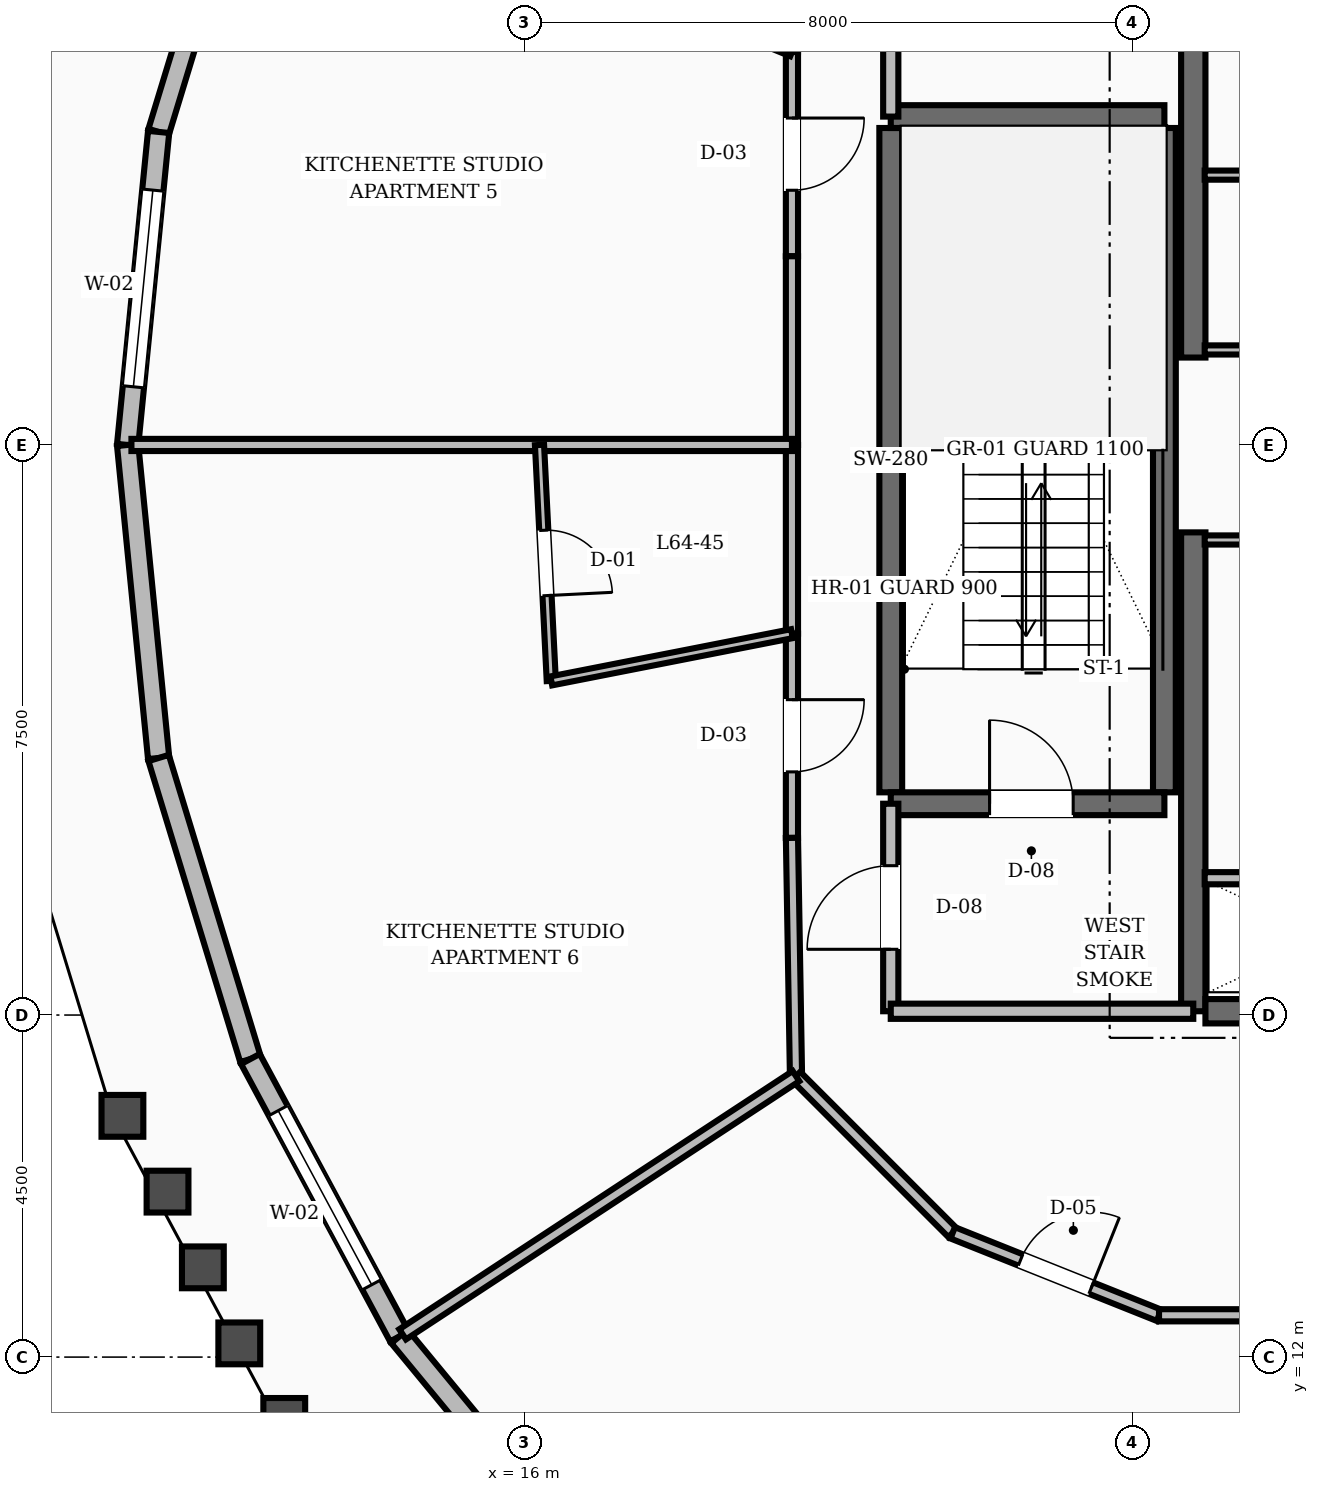
"""IFC4 building model, lengths in metres.
Left out: names, types, materials, properties, quantities, classifications, styles, units other than length and angle.
Written with IfcOpenShell. Run it as: python <this file> out.ifc"""

import sys

from ifc_helpers import new_model, si_unit, direction, frame, frame_2d, origin, place, context, subcontext, project, spatial, rectangle, extrude, element, fill, save


model = new_model("IFC4")
c1 = context("Model", 3, precision=1e-05, world=origin(), true_north=direction((0.0, 1.0)))
c2 = subcontext(c1, "Body", "Model", "MODEL_VIEW")
j1 = project(units=[si_unit("LENGTHUNIT", "METRE"), si_unit("PLANEANGLEUNIT", "RADIAN")], contexts=[c1])
p1 = place(None, origin())
s1 = spatial("IfcSite", under=j1, at=p1, CompositionType="ELEMENT")
p2 = place(p1, origin())
s2 = spatial("IfcBuilding", under=s1, at=p2, CompositionType="ELEMENT")
p3 = place(p2, frame((0.0, 0.0, 247.2)))
s3 = spatial("IfcBuildingStorey", under=s2, at=p3, CompositionType="ELEMENT", Elevation=247.2)
for number, where, z_axis, x_axis in (
    (1, (24.8, 16.55, 0.0), (0.0, 0.0, 1.0), (0.0, 1.0, 0.0)),
    (2, (24.8, 25.15, 0.0), (0.0, 0.0, 1.0), (0.0, 1.0, 0.0)),
):
    element("IfcWall", number, at=place(p3, frame(where, z_axis=z_axis, x_axis=x_axis)), inside=s3, PredefinedType="SHEAR", context=c2, shape_type="SweptSolid", body=[
        extrude(rectangle(XDim=6.3, YDim=0.32, at=frame_2d((3.15, 0.0))), origin(), (0.0, 0.0, 1.0), 3.6),
    ])
p4 = place(p3, frame((24.96, 16.55, 0.0), z_axis=(0.0, 0.0, 1.0), x_axis=(1.0, 0.0, 0.0)))
e3 = element("IfcWall", 3, at=p4, inside=s3, PredefinedType="SHEAR", context=c2, shape_type="SweptSolid", body=[
    extrude(rectangle(XDim=3.24, YDim=0.32, at=frame_2d((1.62, 0.0))), origin(), (0.0, 0.0, 1.0), 3.6),
])
for number, where, z_axis, x_axis in (
    (4, (20.82, 19.43, 0.0), (0.0, 0.0, 1.0), (0.0, 1.0, 0.0)),
    (5, (24.42, 19.43, 0.0), (0.0, 0.0, 1.0), (0.0, 1.0, 0.0)),
):
    element("IfcWall", number, at=place(p3, frame(where, z_axis=z_axis, x_axis=x_axis)), inside=s3, PredefinedType="SHEAR", context=c2, shape_type="SweptSolid", body=[
        extrude(rectangle(XDim=8.74, YDim=0.3, at=frame_2d((4.37, 0.0))), origin(), (0.0, 0.0, 1.0), 3.6),
    ])
p5 = place(p3, frame((20.82, 19.28, 0.0), z_axis=(0.0, 0.0, 1.0), x_axis=(1.0, 0.0, 0.0)))
e6 = element("IfcWall", 6, at=p5, inside=s3, PredefinedType="SHEAR", context=c2, shape_type="SweptSolid", body=[
    extrude(rectangle(XDim=3.6, YDim=0.3, at=frame_2d((1.8, 0.0))), origin(), (0.0, 0.0, 1.0), 3.6),
])
p6 = place(p5, frame((1.3, 0.0, 0.0)))
e7 = element("IfcOpeningElement", 7, at=p6, cuts=e6, PredefinedType="OPENING", context=c2, shape_type="SweptSolid", body=[
    extrude(rectangle(XDim=1.1, YDim=2.1, at=frame_2d((0.55, 1.05))), frame((0.0, 0.16, 0.0), z_axis=(0.0, -1.0, 0.0), x_axis=(1.0, 0.0, 0.0)), (0.0, 0.0, 1.0), 0.32),
])
p7 = place(p3, frame((20.82, 28.32, 0.0), z_axis=(0.0, 0.0, 1.0), x_axis=(1.0, 0.0, 0.0)))
e8 = element("IfcWall", 8, at=p7, inside=s3, PredefinedType="SHEAR", context=c2, shape_type="SweptSolid", body=[
    extrude(rectangle(XDim=3.6, YDim=0.3, at=frame_2d((1.8, 0.0))), origin(), (0.0, 0.0, 1.0), 3.6),
])
p8 = place(p3, frame((12.396, 32.078, 0.0), z_axis=(0.0, 0.0, 1.0), x_axis=(-0.291673136786, -0.95651805068, 0.0)))
e9 = element("IfcWall", 9, at=p8, inside=s3, PredefinedType="STANDARD", context=c2, shape_type="SweptSolid", body=[
    extrude(rectangle(XDim=4.14, YDim=0.28, at=frame_2d((2.07, 0.0))), origin(), (0.0, 0.0, 1.0), 2.88),
])
p9 = place(p3, frame((11.188, 28.118, 0.0), z_axis=(0.0, 0.0, 1.0), x_axis=(-0.098516576832, -0.995135409926, 0.0)))
e10 = element("IfcWall", 10, at=p9, inside=s3, PredefinedType="STANDARD", context=c2, shape_type="SweptSolid", body=[
    extrude(rectangle(XDim=4.138, YDim=0.28, at=frame_2d((2.069, 0.0))), origin(), (0.0, 0.0, 1.0), 2.88),
])
p10 = place(p9, frame((0.769, 0.0, 0.8)))
e11 = element("IfcOpeningElement", 11, at=p10, cuts=e10, PredefinedType="OPENING", context=c2, shape_type="SweptSolid", body=[
    extrude(rectangle(XDim=2.6, YDim=1.65, at=frame_2d((1.3, 0.825))), frame((0.0, 0.15, 0.0), z_axis=(0.0, -1.0, 0.0), x_axis=(1.0, 0.0, 0.0)), (0.0, 0.0, 1.0), 0.3),
])
p11 = place(p3, frame((10.78, 24.0, 0.0), z_axis=(0.0, 0.0, 1.0), x_axis=(0.098516576832, -0.995135409926, 0.0)))
e12 = element("IfcWall", 12, at=p11, inside=s3, PredefinedType="STANDARD", context=c2, shape_type="SweptSolid", body=[
    extrude(rectangle(XDim=4.138, YDim=0.28, at=frame_2d((2.069, 0.0))), origin(), (0.0, 0.0, 1.0), 2.88),
])
p12 = place(p3, frame((11.188, 19.882, 0.0), z_axis=(0.0, 0.0, 1.0), x_axis=(0.291673136786, -0.95651805068, 0.0)))
e13 = element("IfcWall", 13, at=p12, inside=s3, PredefinedType="STANDARD", context=c2, shape_type="SweptSolid", body=[
    extrude(rectangle(XDim=4.14, YDim=0.28, at=frame_2d((2.07, 0.0))), origin(), (0.0, 0.0, 1.0), 2.88),
])
p13 = place(p3, frame((12.396, 15.922, 0.0), z_axis=(0.0, 0.0, 1.0), x_axis=(0.473326520675, -0.880887055658, 0.0)))
e14 = element("IfcWall", 14, at=p13, inside=s3, PredefinedType="STANDARD", context=c2, shape_type="SweptSolid", body=[
    extrude(rectangle(XDim=4.143, YDim=0.28, at=frame_2d((2.071, 0.0))), origin(), (0.0, 0.0, 1.0), 2.88),
])
p14 = place(p13, frame((0.771, 0.0, 0.8)))
e15 = element("IfcOpeningElement", 15, at=p14, cuts=e14, PredefinedType="OPENING", context=c2, shape_type="SweptSolid", body=[
    extrude(rectangle(XDim=2.6, YDim=1.65, at=frame_2d((1.3, 0.825))), frame((0.0, 0.15, 0.0), z_axis=(0.0, -1.0, 0.0), x_axis=(1.0, 0.0, 0.0)), (0.0, 0.0, 1.0), 0.3),
])
p15 = place(p3, frame((14.356, 12.272, 0.0), z_axis=(0.0, 0.0, 1.0), x_axis=(0.63634880002, -0.771401454959, 0.0)))
e16 = element("IfcWall", 16, at=p15, inside=s3, PredefinedType="STANDARD", context=c2, shape_type="SweptSolid", body=[
    extrude(rectangle(XDim=4.147, YDim=0.28, at=frame_2d((2.073, 0.0))), origin(), (0.0, 0.0, 1.0), 2.88),
])
p16 = place(p3, frame((20.82, 16.55, 0.0), z_axis=(0.0, 0.0, 1.0), x_axis=(0.0, 1.0, 0.0)))
e17 = element("IfcWall", 17, at=p16, inside=s3, PredefinedType="SOLIDWALL", context=c2, shape_type="SweptSolid", body=[
    extrude(rectangle(XDim=2.73, YDim=0.2, at=frame_2d((1.365, 0.0))), origin(), (0.0, 0.0, 1.0), 2.87),
])
p17 = place(p16, frame((0.815, 0.0, 0.0)))
e18 = element("IfcOpeningElement", 18, at=p17, cuts=e17, PredefinedType="OPENING", context=c2, shape_type="SweptSolid", body=[
    extrude(rectangle(XDim=1.1, YDim=2.1, at=frame_2d((0.55, 1.05))), frame((0.0, 0.11, 0.0), z_axis=(0.0, -1.0, 0.0), x_axis=(1.0, 0.0, 0.0)), (0.0, 0.0, 1.0), 0.22),
])
p18 = place(p3, frame((20.82, 16.55, 0.0), z_axis=(0.0, 0.0, 1.0), x_axis=(1.0, 0.0, 0.0)))
e19 = element("IfcWall", 19, at=p18, inside=s3, PredefinedType="SOLIDWALL", context=c2, shape_type="SweptSolid", body=[
    extrude(rectangle(XDim=3.98, YDim=0.2, at=frame_2d((1.99, 0.0))), origin(), (0.0, 0.0, 1.0), 2.87),
])
p19 = place(p3, frame((20.82, 28.32, 0.0), z_axis=(0.0, 0.0, 1.0), x_axis=(0.0, 1.0, 0.0)))
e20 = element("IfcWall", 20, at=p19, inside=s3, PredefinedType="SOLIDWALL", context=c2, shape_type="SweptSolid", body=[
    extrude(rectangle(XDim=3.13, YDim=0.2, at=frame_2d((1.565, 0.0))), origin(), (0.0, 0.0, 1.0), 2.87),
])
p20 = place(p19, frame((1.09, 0.0, 0.0)))
e21 = element("IfcOpeningElement", 21, at=p20, cuts=e20, PredefinedType="OPENING", context=c2, shape_type="SweptSolid", body=[
    extrude(rectangle(XDim=0.95, YDim=2.1, at=frame_2d((0.475, 1.05))), frame((0.0, 0.11, 0.0), z_axis=(0.0, -1.0, 0.0), x_axis=(1.0, 0.0, 0.0)), (0.0, 0.0, 1.0), 0.22),
])
p21 = place(p3, frame((24.95, 18.3, 0.0), z_axis=(0.0, 0.0, 1.0), x_axis=(1.0, 0.0, 0.0)))
e22 = element("IfcWall", 22, at=p21, inside=s3, PredefinedType="SOLIDWALL", context=c2, shape_type="SweptSolid", body=[
    extrude(rectangle(XDim=3.2, YDim=0.16, at=frame_2d((1.6, 0.0))), origin(), (0.0, 0.0, 1.0), 2.87),
])
p22 = place(p3, frame((24.95, 25.25, 0.0), z_axis=(0.0, 0.0, 1.0), x_axis=(1.0, 0.0, 0.0)))
e23 = element("IfcWall", 23, at=p22, inside=s3, PredefinedType="PARTITIONING", context=c2, shape_type="SweptSolid", body=[
    extrude(rectangle(XDim=3.2, YDim=0.12, at=frame_2d((1.6, 0.0))), origin(), (0.0, 0.0, 1.0), 2.87),
])
p23 = place(p22, frame((1.125, 0.0, 0.0)))
e24 = element("IfcOpeningElement", 24, at=p23, cuts=e23, PredefinedType="OPENING", context=c2, shape_type="SweptSolid", body=[
    extrude(rectangle(XDim=0.95, YDim=2.1, at=frame_2d((0.475, 1.05))), frame((0.0, 0.07, 0.0), z_axis=(0.0, -1.0, 0.0), x_axis=(1.0, 0.0, 0.0)), (0.0, 0.0, 1.0), 0.14),
])
p24 = place(p3, frame((24.95, 22.75, 0.0), z_axis=(0.0, 0.0, 1.0), x_axis=(1.0, 0.0, 0.0)))
e25 = element("IfcWall", 25, at=p24, inside=s3, PredefinedType="PARTITIONING", context=c2, shape_type="SweptSolid", body=[
    extrude(rectangle(XDim=3.2, YDim=0.12, at=frame_2d((1.6, 0.0))), origin(), (0.0, 0.0, 1.0), 2.87),
])
p25 = place(p24, frame((1.125, 0.0, 0.0)))
e26 = element("IfcOpeningElement", 26, at=p25, cuts=e25, PredefinedType="OPENING", context=c2, shape_type="SweptSolid", body=[
    extrude(rectangle(XDim=0.95, YDim=2.1, at=frame_2d((0.475, 1.05))), frame((0.0, 0.07, 0.0), z_axis=(0.0, -1.0, 0.0), x_axis=(1.0, 0.0, 0.0)), (0.0, 0.0, 1.0), 0.14),
])
p26 = place(p3, frame((24.95, 27.55, 0.0), z_axis=(0.0, 0.0, 1.0), x_axis=(1.0, 0.0, 0.0)))
e27 = element("IfcWall", 27, at=p26, inside=s3, PredefinedType="PARTITIONING", context=c2, shape_type="SweptSolid", body=[
    extrude(rectangle(XDim=3.2, YDim=0.12, at=frame_2d((1.6, 0.0))), origin(), (0.0, 0.0, 1.0), 2.87),
])
p27 = place(p26, frame((1.125, 0.0, 0.0)))
e28 = element("IfcOpeningElement", 28, at=p27, cuts=e27, PredefinedType="OPENING", context=c2, shape_type="SweptSolid", body=[
    extrude(rectangle(XDim=0.95, YDim=2.1, at=frame_2d((0.475, 1.05))), frame((0.0, 0.07, 0.0), z_axis=(0.0, -1.0, 0.0), x_axis=(1.0, 0.0, 0.0)), (0.0, 0.0, 1.0), 0.14),
])
p28 = place(p3, frame((19.573, 32.303, 0.0), z_axis=(0.0, 0.0, 1.0), x_axis=(-0.016981035134, -0.999855811828, 0.0)))
e29 = element("IfcWall", 29, at=p28, inside=s3, PredefinedType="SOLIDWALL", context=c2, shape_type="SweptSolid", body=[
    extrude(rectangle(XDim=3.134, YDim=0.16, at=frame_2d((1.567, 0.0))), origin(), (0.0, 0.0, 1.0), 2.87),
])
p29 = place(p3, frame((19.52, 29.169, 0.0), z_axis=(0.0, 0.0, 1.0), x_axis=(0.0, -1.0, 0.0)))
e30 = element("IfcWall", 30, at=p29, inside=s3, PredefinedType="SOLIDWALL", context=c2, shape_type="SweptSolid", body=[
    extrude(rectangle(XDim=2.687, YDim=0.16, at=frame_2d((1.344, 0.0))), origin(), (0.0, 0.0, 1.0), 2.87),
])
p30 = place(p29, frame((0.868, 0.0, 0.0)))
e31 = element("IfcOpeningElement", 31, at=p30, cuts=e30, PredefinedType="OPENING", context=c2, shape_type="SweptSolid", body=[
    extrude(rectangle(XDim=0.95, YDim=2.1, at=frame_2d((0.475, 1.05))), frame((0.0, 0.09, 0.0), z_axis=(0.0, -1.0, 0.0), x_axis=(1.0, 0.0, 0.0)), (0.0, 0.0, 1.0), 0.18),
])
for number, where, z_axis, x_axis in (
    (32, (19.52, 26.482, 0.0), (0.0, 0.0, 1.0), (0.0, -1.0, 0.0)),
    (33, (19.52, 24.0, 0.0), (0.0, 0.0, 1.0), (0.0, -1.0, 0.0)),
):
    element("IfcWall", number, at=place(p3, frame(where, z_axis=z_axis, x_axis=x_axis)), inside=s3, PredefinedType="SOLIDWALL", context=c2, shape_type="SweptSolid", body=[
        extrude(rectangle(XDim=2.482, YDim=0.16, at=frame_2d((1.241, 0.0))), origin(), (0.0, 0.0, 1.0), 2.87),
    ])
p31 = place(p3, frame((19.52, 21.518, 0.0), z_axis=(0.0, 0.0, 1.0), x_axis=(0.0, -1.0, 0.0)))
e34 = element("IfcWall", 34, at=p31, inside=s3, PredefinedType="SOLIDWALL", context=c2, shape_type="SweptSolid", body=[
    extrude(rectangle(XDim=2.687, YDim=0.16, at=frame_2d((1.344, 0.0))), origin(), (0.0, 0.0, 1.0), 2.87),
])
p32 = place(p31, frame((0.868, 0.0, 0.0)))
e35 = element("IfcOpeningElement", 35, at=p32, cuts=e34, PredefinedType="OPENING", context=c2, shape_type="SweptSolid", body=[
    extrude(rectangle(XDim=0.95, YDim=2.1, at=frame_2d((0.475, 1.05))), frame((0.0, 0.09, 0.0), z_axis=(0.0, -1.0, 0.0), x_axis=(1.0, 0.0, 0.0)), (0.0, 0.0, 1.0), 0.18),
])
p33 = place(p3, frame((19.52, 18.831, 0.0), z_axis=(0.0, 0.0, 1.0), x_axis=(0.016981035134, -0.999855811828, 0.0)))
e36 = element("IfcWall", 36, at=p33, inside=s3, PredefinedType="SOLIDWALL", context=c2, shape_type="SweptSolid", body=[
    extrude(rectangle(XDim=3.134, YDim=0.16, at=frame_2d((1.567, 0.0))), origin(), (0.0, 0.0, 1.0), 2.87),
])
p34 = place(p3, frame((19.573, 15.697, 0.0), z_axis=(0.0, 0.0, 1.0), x_axis=(0.707106781187, -0.707106781187, 0.0)))
e37 = element("IfcWall", 37, at=p34, inside=s3, PredefinedType="SOLIDWALL", context=c2, shape_type="SweptSolid", body=[
    extrude(rectangle(XDim=2.916, YDim=0.16, at=frame_2d((1.458, 0.0))), origin(), (0.0, 0.0, 1.0), 2.87),
])
p35 = place(p3, frame((21.635, 13.635, 0.0), z_axis=(0.0, 0.0, 1.0), x_axis=(0.92856882165, -0.371160266542, 0.0)))
e38 = element("IfcWall", 38, at=p35, inside=s3, PredefinedType="SOLIDWALL", context=c2, shape_type="SweptSolid", body=[
    extrude(rectangle(XDim=2.923, YDim=0.16, at=frame_2d((1.461, 0.0))), origin(), (0.0, 0.0, 1.0), 2.87),
])
p36 = place(p35, frame((0.962, 0.0, 0.0)))
e39 = element("IfcOpeningElement", 39, at=p36, cuts=e38, PredefinedType="OPENING", context=c2, shape_type="SweptSolid", body=[
    extrude(rectangle(XDim=1.0, YDim=2.1, at=frame_2d((0.5, 1.05))), frame((0.0, 0.09, 0.0), z_axis=(0.0, -1.0, 0.0), x_axis=(1.0, 0.0, 0.0)), (0.0, 0.0, 1.0), 0.18),
])
p37 = place(p3, frame((24.349, 12.55, 0.0), z_axis=(0.0, 0.0, 1.0), x_axis=(1.0, 0.0, 0.0)))
e40 = element("IfcWall", 40, at=p37, inside=s3, PredefinedType="SOLIDWALL", context=c2, shape_type="SweptSolid", body=[
    extrude(rectangle(XDim=2.908, YDim=0.16, at=frame_2d((1.454, 0.0))), origin(), (0.0, 0.0, 1.0), 2.87),
])
p38 = place(p3, frame((19.52, 29.169, 0.0), z_axis=(0.0, 0.0, 1.0), x_axis=(-0.925792790323, 0.37803136032, 0.0)))
e41 = element("IfcWall", 41, at=p38, inside=s3, PredefinedType="PARTITIONING", context=c2, shape_type="SweptSolid", body=[
    extrude(rectangle(XDim=2.924, YDim=0.12, at=frame_2d((1.462, 0.0))), origin(), (0.0, 0.0, 1.0), 2.87),
])
p39 = place(p3, frame((19.52, 24.0, 0.0), z_axis=(0.0, 0.0, 1.0), x_axis=(-1.0, 0.0, 0.0)))
e42 = element("IfcWall", 42, at=p39, inside=s3, PredefinedType="SOLIDWALL", context=c2, shape_type="SweptSolid", body=[
    extrude(rectangle(XDim=8.69, YDim=0.16, at=frame_2d((4.345, 0.0))), origin(), (0.0, 0.0, 1.0), 2.87),
])
p40 = place(p3, frame((16.199, 24.0, 0.0), z_axis=(0.0, 0.0, 1.0), x_axis=(0.049804404596, -0.998758990589, 0.0)))
e43 = element("IfcWall", 43, at=p40, inside=s3, PredefinedType="PARTITIONING", context=c2, shape_type="SweptSolid", body=[
    extrude(rectangle(XDim=3.108, YDim=0.12, at=frame_2d((1.554, 0.0))), origin(), (0.0, 0.0, 1.0), 2.87),
])
p41 = place(p40, frame((1.124, 0.0, 0.0)))
e44 = element("IfcOpeningElement", 44, at=p41, cuts=e43, PredefinedType="OPENING", context=c2, shape_type="SweptSolid", body=[
    extrude(rectangle(XDim=0.86, YDim=2.1, at=frame_2d((0.43, 1.05))), frame((0.0, 0.07, 0.0), z_axis=(0.0, -1.0, 0.0), x_axis=(1.0, 0.0, 0.0)), (0.0, 0.0, 1.0), 0.14),
])
p42 = place(p3, frame((19.52, 21.518, 0.0), z_axis=(0.0, 0.0, 1.0), x_axis=(-0.981270024306, -0.192637326076, 0.0)))
e45 = element("IfcWall", 45, at=p42, inside=s3, PredefinedType="PARTITIONING", context=c2, shape_type="SweptSolid", body=[
    extrude(rectangle(XDim=3.227, YDim=0.12, at=frame_2d((1.613, 0.0))), origin(), (0.0, 0.0, 1.0), 2.87),
])
p43 = place(p3, frame((19.573, 15.697, 0.0), z_axis=(0.0, 0.0, 1.0), x_axis=(-0.835967060614, -0.548779622043, 0.0)))
e46 = element("IfcWall", 46, at=p43, inside=s3, PredefinedType="SOLIDWALL", context=c2, shape_type="SweptSolid", body=[
    extrude(rectangle(XDim=6.19, YDim=0.16, at=frame_2d((3.095, 0.0))), origin(), (0.0, 0.0, 1.0), 2.87),
])
p44 = place(p3, frame((27.257, 12.55, 0.0), z_axis=(0.0, 0.0, 1.0), x_axis=(-0.386818468204, -0.922155883057, 0.0)))
e47 = element("IfcWall", 47, at=p44, inside=s3, PredefinedType="SOLIDWALL", context=c2, shape_type="SweptSolid", body=[
    extrude(rectangle(XDim=8.683, YDim=0.16, at=frame_2d((4.341, 0.0))), origin(), (0.0, 0.0, 1.0), 2.87),
])
p45 = place(p10, origin())
e48 = element("IfcWindow", 48, at=p45, inside=s3, PartitioningType="SINGLE_PANEL", PredefinedType="WINDOW", context=c2, shape_type="SweptSolid", body=[
    extrude(rectangle(XDim=2.6, YDim=1.65, at=frame_2d((1.3, 0.825))), frame((0.0, 0.03, 0.0), z_axis=(0.0, -1.0, 0.0), x_axis=(1.0, 0.0, 0.0)), (0.0, 0.0, 1.0), 0.06),
])
fill(e11, e48)
p46 = place(p14, origin())
e49 = element("IfcWindow", 49, at=p46, inside=s3, PartitioningType="SINGLE_PANEL", PredefinedType="WINDOW", context=c2, shape_type="SweptSolid", body=[
    extrude(rectangle(XDim=2.6, YDim=1.65, at=frame_2d((1.3, 0.825))), frame((0.0, 0.03, 0.0), z_axis=(0.0, -1.0, 0.0), x_axis=(1.0, 0.0, 0.0)), (0.0, 0.0, 1.0), 0.06),
])
fill(e15, e49)
p47 = place(p6, origin())
e50 = element("IfcDoor", 50, at=p47, inside=s3, OperationType="SINGLE_SWING_LEFT", PredefinedType="DOOR", context=c2, shape_type="SweptSolid", body=[
    extrude(rectangle(XDim=1.1, YDim=2.1, at=frame_2d((0.55, 1.05))), frame((0.0, 0.025, 0.0), z_axis=(0.0, -1.0, 0.0), x_axis=(1.0, 0.0, 0.0)), (0.0, 0.0, 1.0), 0.05),
])
fill(e7, e50)
p48 = place(p17, origin())
e51 = element("IfcDoor", 51, at=p48, inside=s3, OperationType="SINGLE_SWING_LEFT", PredefinedType="DOOR", context=c2, shape_type="SweptSolid", body=[
    extrude(rectangle(XDim=1.1, YDim=2.1, at=frame_2d((0.55, 1.05))), frame((0.0, 0.025, 0.0), z_axis=(0.0, -1.0, 0.0), x_axis=(1.0, 0.0, 0.0)), (0.0, 0.0, 1.0), 0.05),
])
fill(e18, e51)
p49 = place(p30, origin())
e52 = element("IfcDoor", 52, at=p49, inside=s3, OperationType="SINGLE_SWING_LEFT", PredefinedType="DOOR", context=c2, shape_type="SweptSolid", body=[
    extrude(rectangle(XDim=0.95, YDim=2.1, at=frame_2d((0.475, 1.05))), frame((0.0, 0.025, 0.0), z_axis=(0.0, -1.0, 0.0), x_axis=(1.0, 0.0, 0.0)), (0.0, 0.0, 1.0), 0.05),
])
fill(e31, e52)
p50 = place(p41, origin())
e53 = element("IfcDoor", 53, at=p50, inside=s3, OperationType="SINGLE_SWING_RIGHT", PredefinedType="DOOR", context=c2, shape_type="SweptSolid", body=[
    extrude(rectangle(XDim=0.86, YDim=2.1, at=frame_2d((0.43, 1.05))), frame((0.0, 0.025, 0.0), z_axis=(0.0, -1.0, 0.0), x_axis=(1.0, 0.0, 0.0)), (0.0, 0.0, 1.0), 0.05),
])
fill(e44, e53)
p51 = place(p32, origin())
e54 = element("IfcDoor", 54, at=p51, inside=s3, OperationType="SINGLE_SWING_LEFT", PredefinedType="DOOR", context=c2, shape_type="SweptSolid", body=[
    extrude(rectangle(XDim=0.95, YDim=2.1, at=frame_2d((0.475, 1.05))), frame((0.0, 0.025, 0.0), z_axis=(0.0, -1.0, 0.0), x_axis=(1.0, 0.0, 0.0)), (0.0, 0.0, 1.0), 0.05),
])
fill(e35, e54)
p52 = place(p36, origin())
e55 = element("IfcDoor", 55, at=p52, inside=s3, OperationType="SINGLE_SWING_RIGHT", PredefinedType="DOOR", context=c2, shape_type="SweptSolid", body=[
    extrude(rectangle(XDim=1.0, YDim=2.1, at=frame_2d((0.5, 1.05))), frame((0.0, 0.025, 0.0), z_axis=(0.0, -1.0, 0.0), x_axis=(1.0, 0.0, 0.0)), (0.0, 0.0, 1.0), 0.05),
])
fill(e39, e55)
save(model, sys.argv[1])
